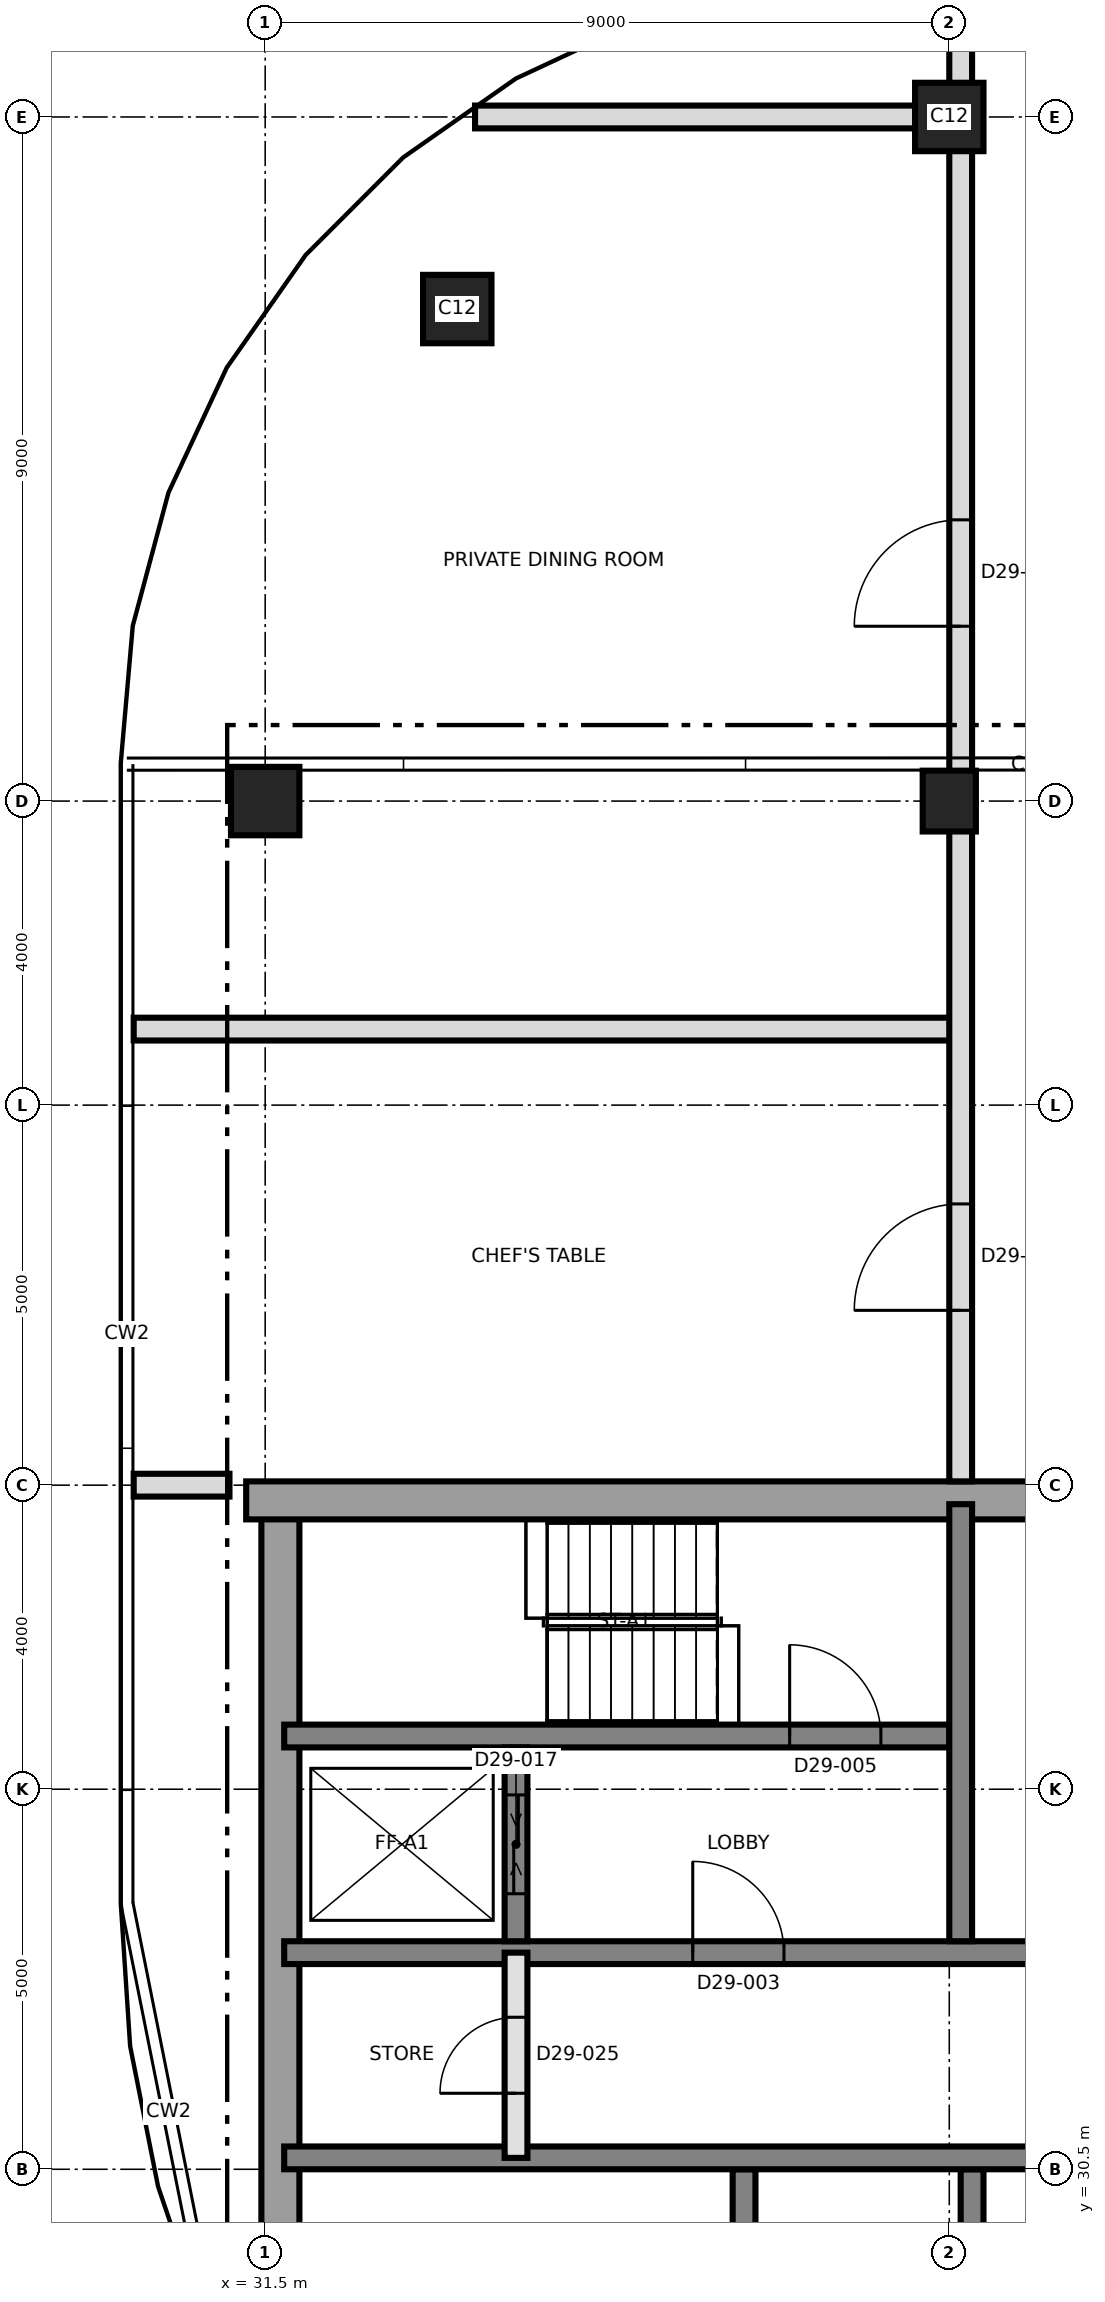
"""IFC4 building model, lengths in metres.
Left out: names, types, materials, properties, quantities, classifications, styles, units other than length and angle.
Written with IfcOpenShell. Run it as: python <this file> out.ifc"""

import sys

from ifc_helpers import new_model, si_unit, direction, frame, frame_2d, origin, origin_2d, place, context, subcontext, project, spatial, rectangle, extrude, element, fill, save


model = new_model("IFC4")
c1 = context("Model", 3, precision=1e-05, world=origin(), true_north=direction((0.0, 1.0)))
c2 = subcontext(c1, "Body", "Model", "MODEL_VIEW")
j1 = project(units=[si_unit("LENGTHUNIT", "METRE"), si_unit("PLANEANGLEUNIT", "RADIAN")], contexts=[c1])
p1 = place(None, origin())
s1 = spatial("IfcSite", under=j1, at=p1, CompositionType="ELEMENT")
p2 = place(p1, origin())
s2 = spatial("IfcBuilding", under=s1, at=p2, CompositionType="ELEMENT")
p3 = place(p2, frame((0.0, 0.0, 254.9)))
s3 = spatial("IfcBuildingStorey", under=s2, at=p3, CompositionType="ELEMENT", Elevation=254.9)
p4 = place(p3, frame((31.7, 21.75, 0.0), z_axis=(0.0, 0.0, 1.0), x_axis=(0.0, 1.0, 0.0)))
e1 = element("IfcWall", 1, at=p4, inside=s3, PredefinedType="SHEAR", context=c2, shape_type="SweptSolid", body=[
    extrude(rectangle(XDim=17.5, YDim=0.5, at=frame_2d((8.75, 0.0))), origin(), (0.0, 0.0, 1.0), 6.0),
])
p5 = place(p3, frame((31.25, 39.3, 0.0), z_axis=(0.0, 0.0, 1.0), x_axis=(1.0, 0.0, 0.0)))
e2 = element("IfcWall", 2, at=p5, inside=s3, PredefinedType="SHEAR", context=c2, shape_type="SweptSolid", body=[
    extrude(rectangle(XDim=27.0, YDim=0.5, at=frame_2d((13.5, 0.0))), origin(), (0.0, 0.0, 1.0), 6.0),
])
p6 = place(p5, frame((10.45, 0.0, 0.0)))
e3 = element("IfcOpeningElement", 3, at=p6, cuts=e2, PredefinedType="OPENING", context=c2, shape_type="SweptSolid", body=[
    extrude(rectangle(XDim=1.2, YDim=2.1, at=frame_2d((0.6, 1.05))), frame((0.0, 0.26, 0.0), z_axis=(0.0, -1.0, 0.0), x_axis=(1.0, 0.0, 0.0)), (0.0, 0.0, 1.0), 0.52),
])
p7 = place(p3, frame((37.8, 21.75, 0.0), z_axis=(0.0, 0.0, 1.0), x_axis=(0.0, 1.0, 0.0)))
e4 = element("IfcWall", 4, at=p7, inside=s3, PredefinedType="SHEAR", context=c2, shape_type="SweptSolid", body=[
    extrude(rectangle(XDim=8.75, YDim=0.3, at=frame_2d((4.375, 0.0))), origin(), (0.0, 0.0, 1.0), 6.0),
])
p8 = place(p7, frame((5.6, 0.0, 0.0)))
e5 = element("IfcOpeningElement", 5, at=p8, cuts=e4, PredefinedType="OPENING", context=c2, shape_type="SweptSolid", body=[
    extrude(rectangle(XDim=1.0, YDim=2.1, at=frame_2d((0.5, 1.05))), frame((0.0, 0.16, 0.0), z_axis=(0.0, -1.0, 0.0), x_axis=(1.0, 0.0, 0.0)), (0.0, 0.0, 1.0), 0.32),
])
p9 = place(p3, frame((40.8, 21.75, 0.0), z_axis=(0.0, 0.0, 1.0), x_axis=(0.0, 1.0, 0.0)))
e6 = element("IfcWall", 6, at=p9, inside=s3, PredefinedType="SHEAR", context=c2, shape_type="SweptSolid", body=[
    extrude(rectangle(XDim=8.75, YDim=0.3, at=frame_2d((4.375, 0.0))), origin(), (0.0, 0.0, 1.0), 6.0),
])
p10 = place(p3, frame((31.75, 30.65, 0.0), z_axis=(0.0, 0.0, 1.0), x_axis=(1.0, 0.0, 0.0)))
e7 = element("IfcWall", 7, at=p10, inside=s3, PredefinedType="SHEAR", context=c2, shape_type="SweptSolid", body=[
    extrude(rectangle(XDim=26.5, YDim=0.3, at=frame_2d((13.25, 0.0))), origin(), (0.0, 0.0, 1.0), 6.0),
])
p11 = place(p10, frame((24.75, 0.0, 0.0)))
e8 = element("IfcOpeningElement", 8, at=p11, cuts=e7, PredefinedType="OPENING", context=c2, shape_type="SweptSolid", body=[
    extrude(rectangle(XDim=1.0, YDim=2.1, at=frame_2d((0.5, 1.05))), frame((0.0, 0.16, 0.0), z_axis=(0.0, -1.0, 0.0), x_axis=(1.0, 0.0, 0.0)), (0.0, 0.0, 1.0), 0.32),
])
p12 = place(p10, frame((11.55, 0.0, 0.0)))
e9 = element("IfcOpeningElement", 9, at=p12, cuts=e7, PredefinedType="OPENING", context=c2, shape_type="SweptSolid", body=[
    extrude(rectangle(XDim=1.0, YDim=2.1, at=frame_2d((0.5, 1.05))), frame((0.0, 0.16, 0.0), z_axis=(0.0, -1.0, 0.0), x_axis=(1.0, 0.0, 0.0)), (0.0, 0.0, 1.0), 0.32),
])
p13 = place(p3, frame((31.75, 33.35, 0.0), z_axis=(0.0, 0.0, 1.0), x_axis=(1.0, 0.0, 0.0)))
e10 = element("IfcWall", 10, at=p13, inside=s3, PredefinedType="SHEAR", context=c2, shape_type="SweptSolid", body=[
    extrude(rectangle(XDim=26.5, YDim=0.3, at=frame_2d((13.25, 0.0))), origin(), (0.0, 0.0, 1.0), 6.0),
])
p14 = place(p13, frame((13.9, 0.0, 0.0)))
e11 = element("IfcOpeningElement", 11, at=p14, cuts=e10, PredefinedType="OPENING", context=c2, shape_type="SweptSolid", body=[
    extrude(rectangle(XDim=1.4, YDim=2.1, at=frame_2d((0.7, 1.05))), frame((0.0, 0.16, 0.0), z_axis=(0.0, -1.0, 0.0), x_axis=(1.0, 0.0, 0.0)), (0.0, 0.0, 1.0), 0.32),
])
p15 = place(p13, frame((5.375, 0.0, 0.0)))
e12 = element("IfcOpeningElement", 12, at=p15, cuts=e10, PredefinedType="OPENING", context=c2, shape_type="SweptSolid", body=[
    extrude(rectangle(XDim=1.2, YDim=2.1, at=frame_2d((0.6, 1.05))), frame((0.0, 0.16, 0.0), z_axis=(0.0, -1.0, 0.0), x_axis=(1.0, 0.0, 0.0)), (0.0, 0.0, 1.0), 0.32),
])
p16 = place(p13, frame((19.925, 0.0, 0.0)))
e13 = element("IfcOpeningElement", 13, at=p16, cuts=e10, PredefinedType="OPENING", context=c2, shape_type="SweptSolid", body=[
    extrude(rectangle(XDim=1.2, YDim=2.1, at=frame_2d((0.6, 1.05))), frame((0.0, 0.16, 0.0), z_axis=(0.0, -1.0, 0.0), x_axis=(1.0, 0.0, 0.0)), (0.0, 0.0, 1.0), 0.32),
])
p17 = place(p3, frame((31.75, 36.2, 0.0), z_axis=(0.0, 0.0, 1.0), x_axis=(1.0, 0.0, 0.0)))
e14 = element("IfcWall", 14, at=p17, inside=s3, PredefinedType="SHEAR", context=c2, shape_type="SweptSolid", body=[
    extrude(rectangle(XDim=8.75, YDim=0.3, at=frame_2d((4.375, 0.0))), origin(), (0.0, 0.0, 1.0), 6.0),
])
p18 = place(p17, frame((6.65, 0.0, 0.0)))
e15 = element("IfcOpeningElement", 15, at=p18, cuts=e14, PredefinedType="OPENING", context=c2, shape_type="SweptSolid", body=[
    extrude(rectangle(XDim=1.2, YDim=2.1, at=frame_2d((0.6, 1.05))), frame((0.0, 0.16, 0.0), z_axis=(0.0, -1.0, 0.0), x_axis=(1.0, 0.0, 0.0)), (0.0, 0.0, 1.0), 0.32),
])
p19 = place(p3, frame((40.65, 33.5, 0.0), z_axis=(0.0, 0.0, 1.0), x_axis=(0.0, 1.0, 0.0)))
e16 = element("IfcWall", 16, at=p19, inside=s3, PredefinedType="SHEAR", context=c2, shape_type="SweptSolid", body=[
    extrude(rectangle(XDim=5.75, YDim=0.3, at=frame_2d((2.875, 0.0))), origin(), (0.0, 0.0, 1.0), 6.0),
])
p20 = place(p3, frame((34.8, 33.5, 0.0), z_axis=(0.0, 0.0, 1.0), x_axis=(0.0, 1.0, 0.0)))
e17 = element("IfcWall", 17, at=p20, inside=s3, PredefinedType="SHEAR", context=c2, shape_type="SweptSolid", body=[
    extrude(rectangle(XDim=2.55, YDim=0.3, at=frame_2d((1.275, 0.0))), origin(), (0.0, 0.0, 1.0), 6.0),
])
p21 = place(p20, frame((0.625, 0.0, 0.0)))
e18 = element("IfcOpeningElement", 18, at=p21, cuts=e17, PredefinedType="OPENING", context=c2, shape_type="SweptSolid", body=[
    extrude(rectangle(XDim=1.3, YDim=2.4, at=frame_2d((0.65, 1.2))), frame((0.0, 0.16, 0.0), z_axis=(0.0, -1.0, 0.0), x_axis=(1.0, 0.0, 0.0)), (0.0, 0.0, 1.0), 0.32),
])
p22 = place(p3, frame((31.5, 48.5, 0.0), z_axis=(0.0, 0.0, 1.0), x_axis=(1.0, 0.0, 0.0)))
e19 = element("IfcColumn", 19, at=p22, inside=s3, PredefinedType="COLUMN", context=c2, shape_type="SweptSolid", body=[
    extrude(rectangle(XDim=0.9, YDim=0.9, at=origin_2d()), origin(), (0.0, 0.0, 1.0), 6.0),
])
p23 = place(p3, frame((40.5, 48.5, 0.0), z_axis=(0.0, 0.0, 1.0), x_axis=(0.0, 1.0, 0.0)))
e20 = element("IfcColumn", 20, at=p23, inside=s3, PredefinedType="COLUMN", context=c2, shape_type="SweptSolid", body=[
    extrude(rectangle(XDim=0.8, YDim=0.7, at=origin_2d()), origin(), (0.0, 0.0, 1.0), 6.0),
])
for number, where, z_axis, x_axis in (
    (21, (34.027, 54.973, 0.0), (0.0, 0.0, 1.0), (1.0, 0.0, 0.0)),
    (22, (40.5, 57.5, 0.0), (0.0, 0.0, 1.0), (1.0, 0.0, 0.0)),
):
    element("IfcColumn", number, at=place(p3, frame(where, z_axis=z_axis, x_axis=x_axis)), inside=s3, PredefinedType="COLUMN", context=c2, shape_type="SweptSolid", body=[
        extrude(rectangle(XDim=0.9, YDim=0.9, at=origin_2d()), origin(), (0.0, 0.0, 1.0), 6.0),
    ])
p24 = place(p3, frame((34.8, 30.65, 0.0), z_axis=(0.0, 0.0, 1.0), x_axis=(0.0, 1.0, 0.0)))
e23 = element("IfcWall", 23, at=p24, inside=s3, PredefinedType="SOLIDWALL", context=c2, shape_type="SweptSolid", body=[
    extrude(rectangle(XDim=2.7, YDim=0.3, at=frame_2d((1.35, 0.0))), origin(), (0.0, 0.0, 1.0), 5.7),
])
p25 = place(p24, frame((0.85, 0.0, 0.0)))
e24 = element("IfcOpeningElement", 24, at=p25, cuts=e23, PredefinedType="OPENING", context=c2, shape_type="SweptSolid", body=[
    extrude(rectangle(XDim=1.0, YDim=2.1, at=frame_2d((0.5, 1.05))), frame((0.0, 0.16, 0.0), z_axis=(0.0, -1.0, 0.0), x_axis=(1.0, 0.0, 0.0)), (0.0, 0.0, 1.0), 0.32),
])
p26 = place(p3, frame((29.77, 39.5, 0.0), z_axis=(0.0, 0.0, 1.0), x_axis=(1.0, 0.0, 0.0)))
e25 = element("IfcWall", 25, at=p26, inside=s3, PredefinedType="PARTITIONING", context=c2, shape_type="SweptSolid", body=[
    extrude(rectangle(XDim=1.26, YDim=0.3, at=frame_2d((0.63, 0.0))), origin(), (0.0, 0.0, 1.0), 5.65),
])
p27 = place(p3, frame((29.77, 45.5, 0.0), z_axis=(0.0, 0.0, 1.0), x_axis=(1.0, 0.0, 0.0)))
e26 = element("IfcWall", 26, at=p27, inside=s3, PredefinedType="PARTITIONING", context=c2, shape_type="SweptSolid", body=[
    extrude(rectangle(XDim=10.88, YDim=0.3, at=frame_2d((5.44, 0.0))), origin(), (0.0, 0.0, 1.0), 5.65),
])
p28 = place(p3, frame((34.261, 57.5, 0.0), z_axis=(0.0, 0.0, 1.0), x_axis=(1.0, 0.0, 0.0)))
e27 = element("IfcWall", 27, at=p28, inside=s3, PredefinedType="PARTITIONING", context=c2, shape_type="SweptSolid", body=[
    extrude(rectangle(XDim=6.389, YDim=0.3, at=frame_2d((3.194, 0.0))), origin(), (0.0, 0.0, 1.0), 5.65),
])
p29 = place(p3, frame((40.65, 39.55, 0.0), z_axis=(0.0, 0.0, 1.0), x_axis=(0.0, 1.0, 0.0)))
e28 = element("IfcWall", 28, at=p29, inside=s3, PredefinedType="PARTITIONING", context=c2, shape_type="SweptSolid", body=[
    extrude(rectangle(XDim=19.0, YDim=0.3, at=frame_2d((9.5, 0.0))), origin(), (0.0, 0.0, 1.0), 5.65),
])
p30 = place(p29, frame((2.25, 0.0, 0.0)))
e29 = element("IfcOpeningElement", 29, at=p30, cuts=e28, PredefinedType="OPENING", context=c2, shape_type="SweptSolid", body=[
    extrude(rectangle(XDim=1.4, YDim=2.1, at=frame_2d((0.7, 1.05))), frame((0.0, 0.16, 0.0), z_axis=(0.0, -1.0, 0.0), x_axis=(1.0, 0.0, 0.0)), (0.0, 0.0, 1.0), 0.32),
])
p31 = place(p29, frame((11.25, 0.0, 0.0)))
e30 = element("IfcOpeningElement", 30, at=p31, cuts=e28, PredefinedType="OPENING", context=c2, shape_type="SweptSolid", body=[
    extrude(rectangle(XDim=1.4, YDim=2.1, at=frame_2d((0.7, 1.05))), frame((0.0, 0.16, 0.0), z_axis=(0.0, -1.0, 0.0), x_axis=(1.0, 0.0, 0.0)), (0.0, 0.0, 1.0), 0.32),
])
p32 = place(p15, origin())
e31 = element("IfcDoor", 31, at=p32, inside=s3, OperationType="SINGLE_SWING_LEFT", PredefinedType="DOOR", context=c2, shape_type="SweptSolid", body=[
    extrude(rectangle(XDim=1.2, YDim=2.1, at=frame_2d((0.6, 1.05))), frame((0.0, 0.025, 0.0), z_axis=(0.0, -1.0, 0.0), x_axis=(1.0, 0.0, 0.0)), (0.0, 0.0, 1.0), 0.05),
])
fill(e12, e31)
p33 = place(p18, origin())
e32 = element("IfcDoor", 32, at=p33, inside=s3, OperationType="SINGLE_SWING_RIGHT", PredefinedType="DOOR", context=c2, shape_type="SweptSolid", body=[
    extrude(rectangle(XDim=1.2, YDim=2.1, at=frame_2d((0.6, 1.05))), frame((0.0, 0.025, 0.0), z_axis=(0.0, -1.0, 0.0), x_axis=(1.0, 0.0, 0.0)), (0.0, 0.0, 1.0), 0.05),
])
fill(e15, e32)
p34 = place(p21, origin())
e33 = element("IfcDoor", 33, at=p34, inside=s3, OperationType="SLIDING_TO_LEFT", PredefinedType="DOOR", context=c2, shape_type="SweptSolid", body=[
    extrude(rectangle(XDim=1.3, YDim=2.4, at=frame_2d((0.65, 1.2))), frame((0.0, 0.025, 0.0), z_axis=(0.0, -1.0, 0.0), x_axis=(1.0, 0.0, 0.0)), (0.0, 0.0, 1.0), 0.05),
])
fill(e18, e33)
p35 = place(p25, origin())
e34 = element("IfcDoor", 34, at=p35, inside=s3, OperationType="SINGLE_SWING_LEFT", PredefinedType="DOOR", context=c2, shape_type="SweptSolid", body=[
    extrude(rectangle(XDim=1.0, YDim=2.1, at=frame_2d((0.5, 1.05))), frame((0.0, 0.025, 0.0), z_axis=(0.0, -1.0, 0.0), x_axis=(1.0, 0.0, 0.0)), (0.0, 0.0, 1.0), 0.05),
])
fill(e24, e34)
p36 = place(p30, origin())
e35 = element("IfcDoor", 35, at=p36, inside=s3, OperationType="SINGLE_SWING_LEFT", PredefinedType="DOOR", context=c2, shape_type="SweptSolid", body=[
    extrude(rectangle(XDim=1.4, YDim=2.1, at=frame_2d((0.7, 1.05))), frame((0.0, 0.025, 0.0), z_axis=(0.0, -1.0, 0.0), x_axis=(1.0, 0.0, 0.0)), (0.0, 0.0, 1.0), 0.05),
])
fill(e29, e35)
p37 = place(p31, origin())
e36 = element("IfcDoor", 36, at=p37, inside=s3, OperationType="SINGLE_SWING_LEFT", PredefinedType="DOOR", context=c2, shape_type="SweptSolid", body=[
    extrude(rectangle(XDim=1.4, YDim=2.1, at=frame_2d((0.7, 1.05))), frame((0.0, 0.025, 0.0), z_axis=(0.0, -1.0, 0.0), x_axis=(1.0, 0.0, 0.0)), (0.0, 0.0, 1.0), 0.05),
])
fill(e30, e36)
save(model, sys.argv[1])
